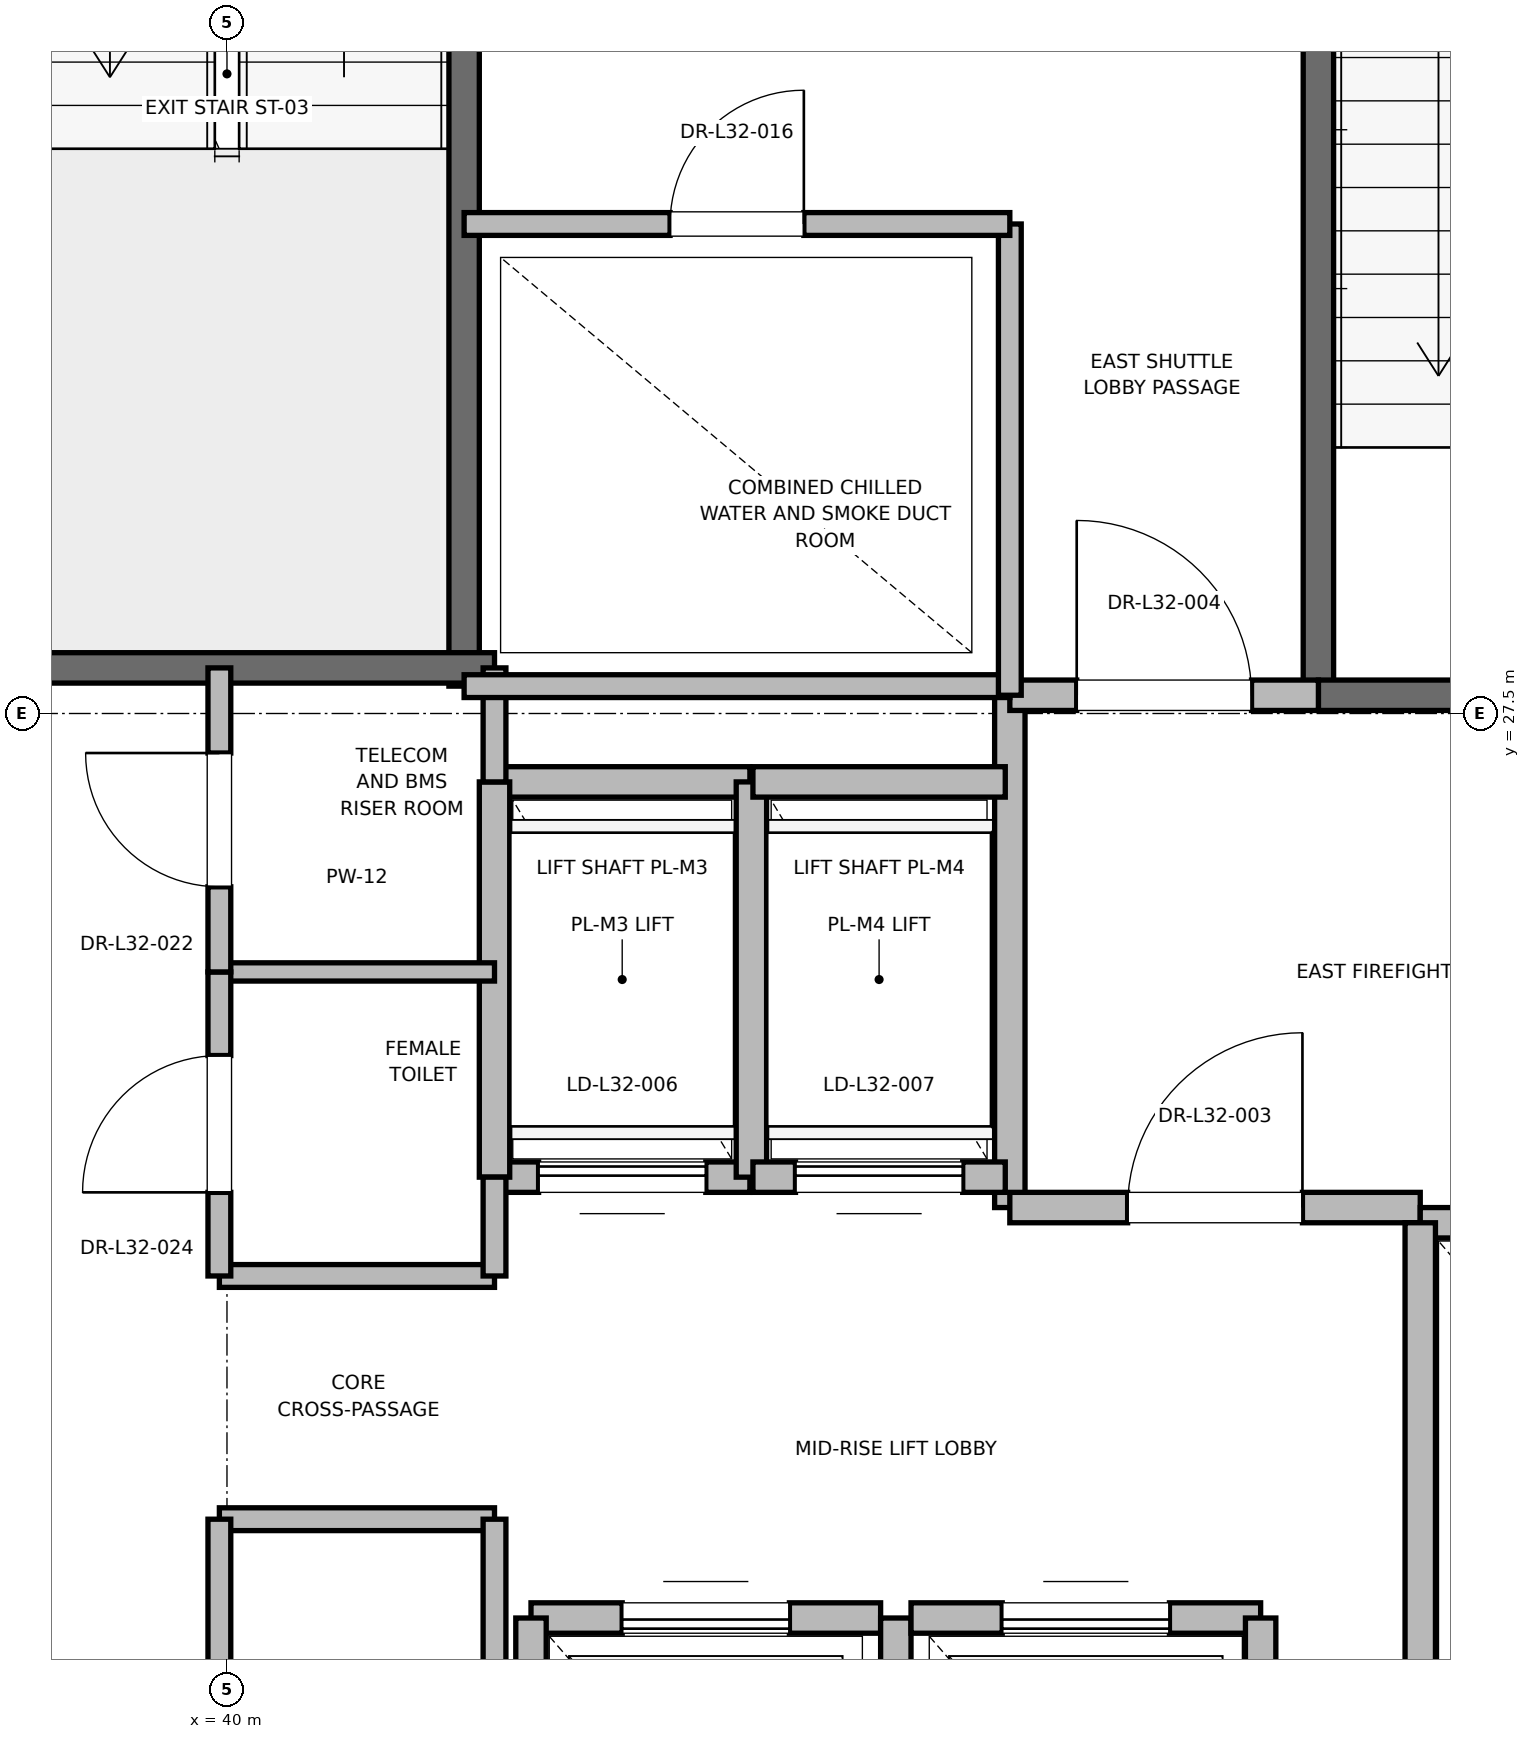
"""IFC4 building model, lengths in metres.
Left out: names, types, materials, properties, quantities, classifications, styles, units other than length and angle.
Written with IfcOpenShell. Run it as: python <this file> out.ifc"""

import sys

from ifc_helpers import new_model, si_unit, direction, frame, frame_2d, origin, place, context, subcontext, project, spatial, rectangle, extrude, element, fill, save


model = new_model("IFC4")
c1 = context("Model", 3, precision=1e-05, world=origin(), true_north=direction((0.0, 1.0)))
c2 = subcontext(c1, "Body", "Model", "MODEL_VIEW")
j1 = project(units=[si_unit("LENGTHUNIT", "METRE"), si_unit("PLANEANGLEUNIT", "RADIAN")], contexts=[c1])
p1 = place(None, origin())
s1 = spatial("IfcSite", under=j1, at=p1, CompositionType="ELEMENT")
p2 = place(p1, origin())
s2 = spatial("IfcBuilding", under=s1, at=p2, CompositionType="ELEMENT")
p3 = place(p2, frame((0.0, 0.0, 140.4)))
s3 = spatial("IfcBuildingStorey", under=s2, at=p3, CompositionType="ELEMENT", Elevation=140.4)
p4 = place(p3, frame((47.18, 27.62, 0.0), z_axis=(0.0, 0.0, 1.0), x_axis=(0.0, 1.0, 0.0)))
e1 = element("IfcWall", 1, at=p4, inside=s3, PredefinedType="SOLIDWALL", context=c2, shape_type="SweptSolid", body=[
    extrude(rectangle(XDim=8.18, YDim=0.2, at=frame_2d((4.09, 0.0))), origin(), (0.0, 0.0, 1.0), 3.775),
])
p5 = place(p3, frame((47.18, 27.62, 0.0), z_axis=(0.0, 0.0, 1.0), x_axis=(1.0, 0.0, 0.0)))
e2 = element("IfcWall", 2, at=p5, inside=s3, PredefinedType="SOLIDWALL", context=c2, shape_type="SweptSolid", body=[
    extrude(rectangle(XDim=3.12, YDim=0.2, at=frame_2d((1.56, 0.0))), origin(), (0.0, 0.0, 1.0), 3.775),
])
p6 = place(p5, frame((1.01, 0.0, 0.0)))
e3 = element("IfcOpeningElement", 3, at=p6, cuts=e2, PredefinedType="OPENING", context=c2, shape_type="SweptSolid", body=[
    extrude(rectangle(XDim=1.1, YDim=2.15, at=frame_2d((0.55, 1.075))), frame((0.0, 0.1, 0.0), z_axis=(0.0, -1.0, 0.0), x_axis=(1.0, 0.0, 0.0)), (0.0, 0.0, 1.0), 0.2),
])
p7 = place(p3, frame((41.56, 27.68, 0.0), z_axis=(0.0, 0.0, 1.0), x_axis=(0.0, 1.0, 0.0)))
e4 = element("IfcWall", 4, at=p7, inside=s3, PredefinedType="SOLIDWALL", context=c2, shape_type="SweptSolid", body=[
    extrude(rectangle(XDim=8.57, YDim=0.2, at=frame_2d((4.285, 0.0))), origin(), (0.0, 0.0, 1.0), 3.775),
])
p8 = place(p3, frame((38.44, 27.8, 0.0), z_axis=(0.0, 0.0, 1.0), x_axis=(1.0, 0.0, 0.0)))
e5 = element("IfcWall", 5, at=p8, inside=s3, PredefinedType="SOLIDWALL", context=c2, shape_type="SweptSolid", body=[
    extrude(rectangle(XDim=3.32, YDim=0.2, at=frame_2d((1.66, 0.0))), origin(), (0.0, 0.0, 1.0), 3.775),
])
p9 = place(p3, frame((45.15, 24.25, 0.0), z_axis=(0.0, 0.0, 1.0), x_axis=(0.0, 1.0, 0.0)))
e6 = element("IfcWall", 6, at=p9, inside=s3, PredefinedType="PARTITIONING", context=c2, shape_type="SweptSolid", body=[
    extrude(rectangle(XDim=3.37, YDim=0.2, at=frame_2d((1.685, 0.0))), origin(), (0.0, 0.0, 1.0), 3.775),
])
p10 = place(p3, frame((45.15, 24.25, 0.0), z_axis=(0.0, 0.0, 1.0), x_axis=(1.0, 0.0, 0.0)))
e7 = element("IfcWall", 7, at=p10, inside=s3, PredefinedType="PARTITIONING", context=c2, shape_type="SweptSolid", body=[
    extrude(rectangle(XDim=2.7, YDim=0.2, at=frame_2d((1.35, 0.0))), origin(), (0.0, 0.0, 1.0), 3.775),
])
p11 = place(p10, frame((0.775, 0.0, 0.0)))
e8 = element("IfcOpeningElement", 8, at=p11, cuts=e7, PredefinedType="OPENING", context=c2, shape_type="SweptSolid", body=[
    extrude(rectangle(XDim=1.15, YDim=2.2, at=frame_2d((0.575, 1.1))), frame((0.0, 0.1, 0.0), z_axis=(0.0, -1.0, 0.0), x_axis=(1.0, 0.0, 0.0)), (0.0, 0.0, 1.0), 0.2),
])
p12 = place(p3, frame((45.15, 27.62, 0.0), z_axis=(0.0, 0.0, 1.0), x_axis=(1.0, 0.0, 0.0)))
e9 = element("IfcWall", 9, at=p12, inside=s3, PredefinedType="PARTITIONING", context=c2, shape_type="SweptSolid", body=[
    extrude(rectangle(XDim=2.03, YDim=0.2, at=frame_2d((1.015, 0.0))), origin(), (0.0, 0.0, 1.0), 3.775),
])
p13 = place(p12, frame((0.44, 0.0, 0.0)))
e10 = element("IfcOpeningElement", 10, at=p13, cuts=e9, PredefinedType="OPENING", context=c2, shape_type="SweptSolid", body=[
    extrude(rectangle(XDim=1.15, YDim=2.2, at=frame_2d((0.575, 1.1))), frame((0.0, 0.1, 0.0), z_axis=(0.0, -1.0, 0.0), x_axis=(1.0, 0.0, 0.0)), (0.0, 0.0, 1.0), 0.2),
])
p14 = place(p3, frame((50.45, 24.15, 0.0), z_axis=(0.0, 0.0, 1.0), x_axis=(-1.0, 0.0, 0.0)))
e11 = element("IfcWall", 11, at=p14, inside=s3, PredefinedType="SOLIDWALL", context=c2, shape_type="SweptSolid", body=[
    extrude(rectangle(XDim=2.6, YDim=0.2, at=frame_2d((1.3, 0.0))), origin(), (0.0, 0.0, 1.0), 2.755),
])
p15 = place(p14, frame((0.75, 0.0, 0.0)))
e12 = element("IfcOpeningElement", 12, at=p15, cuts=e11, PredefinedType="OPENING", context=c2, shape_type="SweptSolid", body=[
    extrude(rectangle(XDim=1.1, YDim=2.2, at=frame_2d((0.55, 1.1))), frame((0.0, 0.1, 0.0), z_axis=(0.0, -1.0, 0.0), x_axis=(1.0, 0.0, 0.0)), (0.0, 0.0, 1.0), 0.2),
])
p16 = place(p3, frame((47.85, 24.15, 0.0), z_axis=(0.0, 0.0, 1.0), x_axis=(0.0, -1.0, 0.0)))
e13 = element("IfcWall", 13, at=p16, inside=s3, PredefinedType="SOLIDWALL", context=c2, shape_type="SweptSolid", body=[
    extrude(rectangle(XDim=3.0, YDim=0.2, at=frame_2d((1.5, 0.0))), origin(), (0.0, 0.0, 1.0), 3.775),
])
p17 = place(p3, frame((44.3, 21.55, 0.0), z_axis=(0.0, 0.0, 1.0), x_axis=(-1.0, 0.0, 0.0)))
e14 = element("IfcWall", 14, at=p17, inside=s3, PredefinedType="SOLIDWALL", context=c2, shape_type="SweptSolid", body=[
    extrude(rectangle(XDim=2.3, YDim=0.2, at=frame_2d((1.15, 0.0))), origin(), (0.0, 0.0, 1.0), 3.775),
])
p18 = place(p17, frame((0.6, 0.0, 0.0)))
e15 = element("IfcOpeningElement", 15, at=p18, cuts=e14, PredefinedType="OPENING", context=c2, shape_type="SweptSolid", body=[
    extrude(rectangle(XDim=1.1, YDim=2.2, at=frame_2d((0.55, 1.1))), frame((0.0, 0.1, 0.0), z_axis=(0.0, -1.0, 0.0), x_axis=(1.0, 0.0, 0.0)), (0.0, 0.0, 1.0), 0.2),
])
p19 = place(p3, frame((42.0, 21.55, 0.0), z_axis=(0.0, 0.0, 1.0), x_axis=(0.0, -1.0, 0.0)))
e16 = element("IfcWall", 16, at=p19, inside=s3, PredefinedType="SOLIDWALL", context=c2, shape_type="SweptSolid", body=[
    extrude(rectangle(XDim=2.6, YDim=0.2, at=frame_2d((1.3, 0.0))), origin(), (0.0, 0.0, 1.0), 2.755),
])
p20 = place(p3, frame((44.4, 18.95, 0.0), z_axis=(0.0, 0.0, 1.0), x_axis=(0.0, 1.0, 0.0)))
e17 = element("IfcWall", 17, at=p20, inside=s3, PredefinedType="SOLIDWALL", context=c2, shape_type="SweptSolid", body=[
    extrude(rectangle(XDim=2.6, YDim=0.2, at=frame_2d((1.3, 0.0))), origin(), (0.0, 0.0, 1.0), 3.775),
])
p21 = place(p3, frame((46.8, 21.55, 0.0), z_axis=(0.0, 0.0, 1.0), x_axis=(-1.0, 0.0, 0.0)))
e18 = element("IfcWall", 18, at=p21, inside=s3, PredefinedType="SOLIDWALL", context=c2, shape_type="SweptSolid", body=[
    extrude(rectangle(XDim=2.3, YDim=0.2, at=frame_2d((1.15, 0.0))), origin(), (0.0, 0.0, 1.0), 3.775),
])
p22 = place(p21, frame((0.6, 0.0, 0.0)))
e19 = element("IfcOpeningElement", 19, at=p22, cuts=e18, PredefinedType="OPENING", context=c2, shape_type="SweptSolid", body=[
    extrude(rectangle(XDim=1.1, YDim=2.2, at=frame_2d((0.55, 1.1))), frame((0.0, 0.1, 0.0), z_axis=(0.0, -1.0, 0.0), x_axis=(1.0, 0.0, 0.0)), (0.0, 0.0, 1.0), 0.2),
])
p23 = place(p3, frame((46.8, 18.95, 0.0), z_axis=(0.0, 0.0, 1.0), x_axis=(0.0, 1.0, 0.0)))
e20 = element("IfcWall", 20, at=p23, inside=s3, PredefinedType="SOLIDWALL", context=c2, shape_type="SweptSolid", body=[
    extrude(rectangle(XDim=2.6, YDim=0.2, at=frame_2d((1.3, 0.0))), origin(), (0.0, 0.0, 1.0), 3.775),
])
p24 = place(p3, frame((41.76, 24.45, 0.0), z_axis=(0.0, 0.0, 1.0), x_axis=(1.0, 0.0, 0.0)))
e21 = element("IfcWall", 21, at=p24, inside=s3, PredefinedType="SOLIDWALL", context=c2, shape_type="SweptSolid", body=[
    extrude(rectangle(XDim=1.68, YDim=0.2, at=frame_2d((0.84, 0.0))), origin(), (0.0, 0.0, 1.0), 3.775),
])
p25 = place(p24, frame((0.29, 0.0, 0.0)))
e22 = element("IfcOpeningElement", 22, at=p25, cuts=e21, PredefinedType="OPENING", context=c2, shape_type="SweptSolid", body=[
    extrude(rectangle(XDim=1.1, YDim=2.2, at=frame_2d((0.55, 1.1))), frame((0.0, 0.1, 0.0), z_axis=(0.0, -1.0, 0.0), x_axis=(1.0, 0.0, 0.0)), (0.0, 0.0, 1.0), 0.2),
])
p26 = place(p3, frame((43.44, 27.05, 0.0), z_axis=(0.0, 0.0, 1.0), x_axis=(-1.0, 0.0, 0.0)))
e23 = element("IfcWall", 23, at=p26, inside=s3, PredefinedType="SOLIDWALL", context=c2, shape_type="SweptSolid", body=[
    extrude(rectangle(XDim=1.68, YDim=0.2, at=frame_2d((0.84, 0.0))), origin(), (0.0, 0.0, 1.0), 3.775),
])
for number, where, z_axis, x_axis in (
    (24, (41.76, 27.05, 0.0), (0.0, 0.0, 1.0), (0.0, -1.0, 0.0)),
    (25, (43.45, 24.45, 0.0), (0.0, 0.0, 1.0), (0.0, 1.0, 0.0)),
):
    element("IfcWall", number, at=place(p3, frame(where, z_axis=z_axis, x_axis=x_axis)), inside=s3, PredefinedType="SOLIDWALL", context=c2, shape_type="SweptSolid", body=[
        extrude(rectangle(XDim=2.6, YDim=0.2, at=frame_2d((1.3, 0.0))), origin(), (0.0, 0.0, 1.0), 3.775),
    ])
p27 = place(p3, frame((43.46, 24.45, 0.0), z_axis=(0.0, 0.0, 1.0), x_axis=(1.0, 0.0, 0.0)))
e26 = element("IfcWall", 26, at=p27, inside=s3, PredefinedType="SOLIDWALL", context=c2, shape_type="SweptSolid", body=[
    extrude(rectangle(XDim=1.66, YDim=0.2, at=frame_2d((0.83, 0.0))), origin(), (0.0, 0.0, 1.0), 3.775),
])
p28 = place(p27, frame((0.28, 0.0, 0.0)))
e27 = element("IfcOpeningElement", 27, at=p28, cuts=e26, PredefinedType="OPENING", context=c2, shape_type="SweptSolid", body=[
    extrude(rectangle(XDim=1.1, YDim=2.2, at=frame_2d((0.55, 1.1))), frame((0.0, 0.1, 0.0), z_axis=(0.0, -1.0, 0.0), x_axis=(1.0, 0.0, 0.0)), (0.0, 0.0, 1.0), 0.2),
])
p29 = place(p3, frame((45.12, 27.05, 0.0), z_axis=(0.0, 0.0, 1.0), x_axis=(-1.0, 0.0, 0.0)))
e28 = element("IfcWall", 28, at=p29, inside=s3, PredefinedType="SOLIDWALL", context=c2, shape_type="SweptSolid", body=[
    extrude(rectangle(XDim=1.66, YDim=0.2, at=frame_2d((0.83, 0.0))), origin(), (0.0, 0.0, 1.0), 3.775),
])
for number, where, z_axis, x_axis in (
    (29, (39.95, 22.2, 0.0), (0.0, 0.0, 1.0), (1.0, 0.0, 0.0)),
    (30, (39.95, 23.8, 0.0), (0.0, 0.0, 1.0), (1.0, 0.0, 0.0)),
):
    element("IfcWall", number, at=place(p3, frame(where, z_axis=z_axis, x_axis=x_axis)), inside=s3, PredefinedType="PARTITIONING", context=c2, shape_type="SweptSolid", body=[
        extrude(rectangle(XDim=1.81, YDim=0.15, at=frame_2d((0.905, 0.0))), origin(), (0.0, 0.0, 1.0), 2.85),
    ])
p30 = place(p3, frame((39.95, 25.8, 0.0), z_axis=(0.0, 0.0, 1.0), x_axis=(1.0, 0.0, 0.0)))
e31 = element("IfcWall", 31, at=p30, inside=s3, PredefinedType="PARTITIONING", context=c2, shape_type="SweptSolid", body=[
    extrude(rectangle(XDim=1.81, YDim=0.12, at=frame_2d((0.905, 0.0))), origin(), (0.0, 0.0, 1.0), 2.85),
])
p31 = place(p3, frame((41.76, 18.6, 0.0), z_axis=(0.0, 0.0, 1.0), x_axis=(0.0, 1.0, 0.0)))
e32 = element("IfcWall", 32, at=p31, inside=s3, PredefinedType="PARTITIONING", context=c2, shape_type="SweptSolid", body=[
    extrude(rectangle(XDim=3.6, YDim=0.15, at=frame_2d((1.8, 0.0))), origin(), (0.0, 0.0, 1.0), 2.755),
])
p32 = place(p3, frame((41.76, 23.8, 0.0), z_axis=(0.0, 0.0, 1.0), x_axis=(0.0, 1.0, 0.0)))
e33 = element("IfcWall", 33, at=p32, inside=s3, PredefinedType="PARTITIONING", context=c2, shape_type="SweptSolid", body=[
    extrude(rectangle(XDim=0.65, YDim=0.15, at=frame_2d((0.325, 0.0))), origin(), (0.0, 0.0, 1.0), 2.85),
])
p33 = place(p3, frame((41.76, 27.05, 0.0), z_axis=(0.0, 0.0, 1.0), x_axis=(0.0, 1.0, 0.0)))
e34 = element("IfcWall", 34, at=p33, inside=s3, PredefinedType="PARTITIONING", context=c2, shape_type="SweptSolid", body=[
    extrude(rectangle(XDim=0.75, YDim=0.15, at=frame_2d((0.375, 0.0))), origin(), (0.0, 0.0, 1.0), 2.85),
])
p34 = place(p3, frame((39.95, 19.2, 0.0), z_axis=(0.0, 0.0, 1.0), x_axis=(0.0, 1.0, 0.0)))
e35 = element("IfcWall", 35, at=p34, inside=s3, PredefinedType="PARTITIONING", context=c2, shape_type="SweptSolid", body=[
    extrude(rectangle(XDim=3.0, YDim=0.15, at=frame_2d((1.5, 0.0))), origin(), (0.0, 0.0, 1.0), 2.85),
])
p35 = place(p34, frame((1.05, 0.0, 0.0)))
e36 = element("IfcOpeningElement", 36, at=p35, cuts=e35, PredefinedType="OPENING", context=c2, shape_type="SweptSolid", body=[
    extrude(rectangle(XDim=0.9, YDim=2.1, at=frame_2d((0.45, 1.05))), frame((0.0, 0.075, 0.0), z_axis=(0.0, -1.0, 0.0), x_axis=(1.0, 0.0, 0.0)), (0.0, 0.0, 1.0), 0.15),
])
p36 = place(p3, frame((39.95, 23.8, 0.0), z_axis=(0.0, 0.0, 1.0), x_axis=(0.0, 1.0, 0.0)))
e37 = element("IfcWall", 37, at=p36, inside=s3, PredefinedType="PARTITIONING", context=c2, shape_type="SweptSolid", body=[
    extrude(rectangle(XDim=2.0, YDim=0.15, at=frame_2d((1.0, 0.0))), origin(), (0.0, 0.0, 1.0), 2.85),
])
p37 = place(p36, frame((0.55, 0.0, 0.0)))
e38 = element("IfcOpeningElement", 38, at=p37, cuts=e37, PredefinedType="OPENING", context=c2, shape_type="SweptSolid", body=[
    extrude(rectangle(XDim=0.9, YDim=2.1, at=frame_2d((0.45, 1.05))), frame((0.0, 0.075, 0.0), z_axis=(0.0, -1.0, 0.0), x_axis=(1.0, 0.0, 0.0)), (0.0, 0.0, 1.0), 0.15),
])
p38 = place(p3, frame((39.95, 25.8, 0.0), z_axis=(0.0, 0.0, 1.0), x_axis=(0.0, 1.0, 0.0)))
e39 = element("IfcWall", 39, at=p38, inside=s3, PredefinedType="PARTITIONING", context=c2, shape_type="SweptSolid", body=[
    extrude(rectangle(XDim=2.0, YDim=0.15, at=frame_2d((1.0, 0.0))), origin(), (0.0, 0.0, 1.0), 2.85),
])
p39 = place(p38, frame((0.56, 0.0, 0.0)))
e40 = element("IfcOpeningElement", 40, at=p39, cuts=e39, PredefinedType="OPENING", context=c2, shape_type="SweptSolid", body=[
    extrude(rectangle(XDim=0.88, YDim=2.1, at=frame_2d((0.44, 1.05))), frame((0.0, 0.075, 0.0), z_axis=(0.0, -1.0, 0.0), x_axis=(1.0, 0.0, 0.0)), (0.0, 0.0, 1.0), 0.15),
])
p40 = place(p3, frame((41.56, 27.68, 0.0), z_axis=(0.0, 0.0, 1.0), x_axis=(1.0, 0.0, 0.0)))
e41 = element("IfcWall", 41, at=p40, inside=s3, PredefinedType="PARTITIONING", context=c2, shape_type="SweptSolid", body=[
    extrude(rectangle(XDim=3.59, YDim=0.15, at=frame_2d((1.795, 0.0))), origin(), (0.0, 0.0, 1.0), 2.85),
])
p41 = place(p3, frame((45.15, 27.62, 0.0), z_axis=(0.0, 0.0, 1.0), x_axis=(0.0, 1.0, 0.0)))
e42 = element("IfcWall", 42, at=p41, inside=s3, PredefinedType="PARTITIONING", context=c2, shape_type="SweptSolid", body=[
    extrude(rectangle(XDim=3.1, YDim=0.15, at=frame_2d((1.55, 0.0))), origin(), (0.0, 0.0, 1.0), 2.85),
])
p42 = place(p3, frame((41.56, 30.72, 0.0), z_axis=(0.0, 0.0, 1.0), x_axis=(1.0, 0.0, 0.0)))
e43 = element("IfcWall", 43, at=p42, inside=s3, PredefinedType="PARTITIONING", context=c2, shape_type="SweptSolid", body=[
    extrude(rectangle(XDim=3.59, YDim=0.15, at=frame_2d((1.795, 0.0))), origin(), (0.0, 0.0, 1.0), 2.85),
])
p43 = place(p42, frame((1.355, 0.0, 0.0)))
e44 = element("IfcOpeningElement", 44, at=p43, cuts=e43, PredefinedType="OPENING", context=c2, shape_type="SweptSolid", body=[
    extrude(rectangle(XDim=0.88, YDim=2.1, at=frame_2d((0.44, 1.05))), frame((0.0, 0.075, 0.0), z_axis=(0.0, -1.0, 0.0), x_axis=(1.0, 0.0, 0.0)), (0.0, 0.0, 1.0), 0.15),
])
p44 = place(p11, origin())
e45 = element("IfcDoor", 45, at=p44, inside=s3, OperationType="SINGLE_SWING_RIGHT", PredefinedType="DOOR", context=c2, shape_type="SweptSolid", body=[
    extrude(rectangle(XDim=1.15, YDim=2.2, at=frame_2d((0.575, 1.1))), frame((0.0, 0.025, 0.0), z_axis=(0.0, -1.0, 0.0), x_axis=(1.0, 0.0, 0.0)), (0.0, 0.0, 1.0), 0.05),
])
fill(e8, e45)
p45 = place(p13, origin())
e46 = element("IfcDoor", 46, at=p45, inside=s3, OperationType="SINGLE_SWING_LEFT", PredefinedType="DOOR", context=c2, shape_type="SweptSolid", body=[
    extrude(rectangle(XDim=1.15, YDim=2.2, at=frame_2d((0.575, 1.1))), frame((0.0, 0.025, 0.0), z_axis=(0.0, -1.0, 0.0), x_axis=(1.0, 0.0, 0.0)), (0.0, 0.0, 1.0), 0.05),
])
fill(e10, e46)
p46 = place(p18, origin())
e47 = element("IfcDoor", 47, at=p46, inside=s3, OperationType="SLIDING_TO_RIGHT", PredefinedType="DOOR", context=c2, shape_type="SweptSolid", body=[
    extrude(rectangle(XDim=1.1, YDim=2.2, at=frame_2d((0.55, 1.1))), frame((0.0, 0.025, 0.0), z_axis=(0.0, -1.0, 0.0), x_axis=(1.0, 0.0, 0.0)), (0.0, 0.0, 1.0), 0.05),
])
fill(e15, e47)
p47 = place(p22, origin())
e48 = element("IfcDoor", 48, at=p47, inside=s3, OperationType="SLIDING_TO_RIGHT", PredefinedType="DOOR", context=c2, shape_type="SweptSolid", body=[
    extrude(rectangle(XDim=1.1, YDim=2.2, at=frame_2d((0.55, 1.1))), frame((0.0, 0.025, 0.0), z_axis=(0.0, -1.0, 0.0), x_axis=(1.0, 0.0, 0.0)), (0.0, 0.0, 1.0), 0.05),
])
fill(e19, e48)
p48 = place(p25, origin())
e49 = element("IfcDoor", 49, at=p48, inside=s3, OperationType="SLIDING_TO_RIGHT", PredefinedType="DOOR", context=c2, shape_type="SweptSolid", body=[
    extrude(rectangle(XDim=1.1, YDim=2.2, at=frame_2d((0.55, 1.1))), frame((0.0, 0.025, 0.0), z_axis=(0.0, -1.0, 0.0), x_axis=(1.0, 0.0, 0.0)), (0.0, 0.0, 1.0), 0.05),
])
fill(e22, e49)
p49 = place(p28, origin())
e50 = element("IfcDoor", 50, at=p49, inside=s3, OperationType="SLIDING_TO_RIGHT", PredefinedType="DOOR", context=c2, shape_type="SweptSolid", body=[
    extrude(rectangle(XDim=1.1, YDim=2.2, at=frame_2d((0.55, 1.1))), frame((0.0, 0.025, 0.0), z_axis=(0.0, -1.0, 0.0), x_axis=(1.0, 0.0, 0.0)), (0.0, 0.0, 1.0), 0.05),
])
fill(e27, e50)
p50 = place(p37, origin())
e51 = element("IfcDoor", 51, at=p50, inside=s3, OperationType="SINGLE_SWING_LEFT", PredefinedType="DOOR", context=c2, shape_type="SweptSolid", body=[
    extrude(rectangle(XDim=0.9, YDim=2.1, at=frame_2d((0.45, 1.05))), frame((0.0, 0.025, 0.0), z_axis=(0.0, -1.0, 0.0), x_axis=(1.0, 0.0, 0.0)), (0.0, 0.0, 1.0), 0.05),
])
fill(e38, e51)
p51 = place(p39, origin())
e52 = element("IfcDoor", 52, at=p51, inside=s3, OperationType="SINGLE_SWING_RIGHT", PredefinedType="DOOR", context=c2, shape_type="SweptSolid", body=[
    extrude(rectangle(XDim=0.88, YDim=2.1, at=frame_2d((0.44, 1.05))), frame((0.0, 0.025, 0.0), z_axis=(0.0, -1.0, 0.0), x_axis=(1.0, 0.0, 0.0)), (0.0, 0.0, 1.0), 0.05),
])
fill(e40, e52)
p52 = place(p43, origin())
e53 = element("IfcDoor", 53, at=p52, inside=s3, OperationType="SINGLE_SWING_RIGHT", PredefinedType="DOOR", context=c2, shape_type="SweptSolid", body=[
    extrude(rectangle(XDim=0.88, YDim=2.1, at=frame_2d((0.44, 1.05))), frame((0.0, 0.025, 0.0), z_axis=(0.0, -1.0, 0.0), x_axis=(1.0, 0.0, 0.0)), (0.0, 0.0, 1.0), 0.05),
])
fill(e44, e53)
save(model, sys.argv[1])
